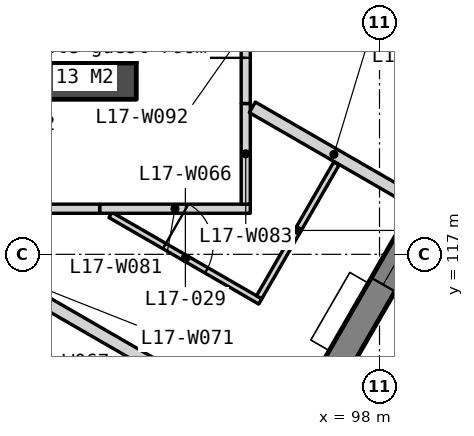
"""IFC4 building model, lengths in metres.
Left out: names, types, materials, properties, quantities, classifications, styles, units other than length and angle.
Written with IfcOpenShell. Run it as: python <this file> out.ifc"""

import sys

from ifc_helpers import new_model, si_unit, direction, frame, frame_2d, origin, place, context, subcontext, project, spatial, polyline, rectangle, outline, extrude, element, fill, save


model = new_model("IFC4")
c1 = context("Model", 3, precision=1e-05, world=origin(), true_north=direction((0.0, 1.0)))
c2 = subcontext(c1, "Body", "Model", "MODEL_VIEW")
j1 = project(units=[si_unit("LENGTHUNIT", "METRE"), si_unit("PLANEANGLEUNIT", "RADIAN")], contexts=[c1])
p1 = place(None, origin())
s1 = spatial("IfcSite", under=j1, at=p1, CompositionType="ELEMENT")
p2 = place(p1, origin())
s2 = spatial("IfcBuilding", under=s1, at=p2, CompositionType="ELEMENT")
p3 = place(p2, frame((0.0, 0.0, 73.5)))
s3 = spatial("IfcBuildingStorey", under=s2, at=p3, CompositionType="ELEMENT", Elevation=73.5)
p4 = place(p3, frame((66.0, 119.85, 0.0), z_axis=(0.0, 0.0, 1.0), x_axis=(1.0, 0.0, 0.0)))
e1 = element("IfcWall", 1, at=p4, inside=s3, PredefinedType="SOLIDWALL", context=c2, shape_type="SweptSolid", body=[
    extrude(rectangle(XDim=28.0, YDim=0.6, at=frame_2d((14.0, 0.0))), origin(), (0.0, 0.0, 1.0), 3.25),
])
p5 = place(p4, frame((6.825, 0.0, 0.0)))
e2 = element("IfcOpeningElement", 2, at=p5, cuts=e1, PredefinedType="OPENING", context=c2, shape_type="SweptSolid", body=[
    extrude(rectangle(XDim=1.8, YDim=2.1, at=frame_2d((0.9, 1.05))), frame((0.0, 0.31, 0.0), z_axis=(0.0, -1.0, 0.0), x_axis=(1.0, 0.0, 0.0)), (0.0, 0.0, 1.0), 0.62),
])
p6 = place(p4, frame((15.85, 0.0, 0.0)))
e3 = element("IfcOpeningElement", 3, at=p6, cuts=e1, PredefinedType="OPENING", context=c2, shape_type="SweptSolid", body=[
    extrude(rectangle(XDim=1.5, YDim=2.1, at=frame_2d((0.75, 1.05))), frame((0.0, 0.31, 0.0), z_axis=(0.0, -1.0, 0.0), x_axis=(1.0, 0.0, 0.0)), (0.0, 0.0, 1.0), 0.62),
])
p7 = place(p4, frame((19.375, 0.0, 0.0)))
e4 = element("IfcOpeningElement", 4, at=p7, cuts=e1, PredefinedType="OPENING", context=c2, shape_type="SweptSolid", body=[
    extrude(rectangle(XDim=1.8, YDim=2.1, at=frame_2d((0.9, 1.05))), frame((0.0, 0.31, 0.0), z_axis=(0.0, -1.0, 0.0), x_axis=(1.0, 0.0, 0.0)), (0.0, 0.0, 1.0), 0.62),
])
p8 = place(p4, frame((4.425, 0.0, 0.0)))
e5 = element("IfcOpeningElement", 5, at=p8, cuts=e1, PredefinedType="OPENING", context=c2, shape_type="SweptSolid", body=[
    extrude(rectangle(XDim=1.0, YDim=2.1, at=frame_2d((0.5, 1.05))), frame((0.0, 0.31, 0.0), z_axis=(0.0, -1.0, 0.0), x_axis=(1.0, 0.0, 0.0)), (0.0, 0.0, 1.0), 0.62),
])
p9 = place(p4, frame((9.783, 0.0, 0.0)))
e6 = element("IfcOpeningElement", 6, at=p9, cuts=e1, PredefinedType="OPENING", context=c2, shape_type="SweptSolid", body=[
    extrude(rectangle(XDim=1.0, YDim=2.1, at=frame_2d((0.5, 1.05))), frame((0.0, 0.31, 0.0), z_axis=(0.0, -1.0, 0.0), x_axis=(1.0, 0.0, 0.0)), (0.0, 0.0, 1.0), 0.62),
])
p10 = place(p4, frame((11.525, 0.0, 0.0)))
e7 = element("IfcOpeningElement", 7, at=p10, cuts=e1, PredefinedType="OPENING", context=c2, shape_type="SweptSolid", body=[
    extrude(rectangle(XDim=1.0, YDim=2.1, at=frame_2d((0.5, 1.05))), frame((0.0, 0.31, 0.0), z_axis=(0.0, -1.0, 0.0), x_axis=(1.0, 0.0, 0.0)), (0.0, 0.0, 1.0), 0.62),
])
p11 = place(p4, frame((13.658, 0.0, 0.0)))
e8 = element("IfcOpeningElement", 8, at=p11, cuts=e1, PredefinedType="OPENING", context=c2, shape_type="SweptSolid", body=[
    extrude(rectangle(XDim=1.0, YDim=2.1, at=frame_2d((0.5, 1.05))), frame((0.0, 0.31, 0.0), z_axis=(0.0, -1.0, 0.0), x_axis=(1.0, 0.0, 0.0)), (0.0, 0.0, 1.0), 0.62),
])
p12 = place(p4, frame((22.575, 0.0, 0.0)))
e9 = element("IfcOpeningElement", 9, at=p12, cuts=e1, PredefinedType="OPENING", context=c2, shape_type="SweptSolid", body=[
    extrude(rectangle(XDim=1.0, YDim=2.1, at=frame_2d((0.5, 1.05))), frame((0.0, 0.31, 0.0), z_axis=(0.0, -1.0, 0.0), x_axis=(1.0, 0.0, 0.0)), (0.0, 0.0, 1.0), 0.62),
])
p13 = place(p3, frame((93.7, 133.95, 0.0), z_axis=(0.0, 0.0, 1.0), x_axis=(0.0, -1.0, 0.0)))
e10 = element("IfcWall", 10, at=p13, inside=s3, PredefinedType="SOLIDWALL", context=c2, shape_type="SweptSolid", body=[
    extrude(rectangle(XDim=13.8, YDim=0.6, at=frame_2d((6.9, 0.0))), origin(), (0.0, 0.0, 1.0), 3.25),
])
p14 = place(p13, frame((0.6, 0.0, 0.0)))
e11 = element("IfcOpeningElement", 11, at=p14, cuts=e10, PredefinedType="OPENING", context=c2, shape_type="SweptSolid", body=[
    extrude(rectangle(XDim=1.1, YDim=2.1, at=frame_2d((0.55, 1.05))), frame((0.0, 0.31, 0.0), z_axis=(0.0, -1.0, 0.0), x_axis=(1.0, 0.0, 0.0)), (0.0, 0.0, 1.0), 0.62),
])
p15 = place(p13, frame((8.35, 0.0, 0.0)))
e12 = element("IfcOpeningElement", 12, at=p15, cuts=e10, PredefinedType="OPENING", context=c2, shape_type="SweptSolid", body=[
    extrude(rectangle(XDim=0.826, YDim=2.1, at=frame_2d((0.413, 1.05))), frame((0.0, 0.31, 0.0), z_axis=(0.0, -1.0, 0.0), x_axis=(1.0, 0.0, 0.0)), (0.0, 0.0, 1.0), 0.62),
])
p16 = place(p13, frame((10.071, 0.0, 0.0)))
e13 = element("IfcOpeningElement", 13, at=p16, cuts=e10, PredefinedType="OPENING", context=c2, shape_type="SweptSolid", body=[
    extrude(rectangle(XDim=1.0, YDim=2.1, at=frame_2d((0.5, 1.05))), frame((0.0, 0.31, 0.0), z_axis=(0.0, -1.0, 0.0), x_axis=(1.0, 0.0, 0.0)), (0.0, 0.0, 1.0), 0.62),
])
p17 = place(p13, frame((12.258, 0.0, 0.0)))
e14 = element("IfcOpeningElement", 14, at=p17, cuts=e10, PredefinedType="OPENING", context=c2, shape_type="SweptSolid", body=[
    extrude(rectangle(XDim=1.0, YDim=2.1, at=frame_2d((0.5, 1.05))), frame((0.0, 0.31, 0.0), z_axis=(0.0, -1.0, 0.0), x_axis=(1.0, 0.0, 0.0)), (0.0, 0.0, 1.0), 0.62),
])
p18 = place(p3, frame((83.105, 90.599, -0.15), z_axis=(0.0, 0.0, 1.0), x_axis=(0.499999201451, 0.866025864826, 0.0)))
e15 = element("IfcWall", 15, at=p18, inside=s3, PredefinedType="SOLIDWALL", context=c2, shape_type="SweptSolid", body=[
    extrude(outline(polyline([(44.8, 0.0), (44.8, 3.4), (0.0, 3.4), (0.0, 0.0), (44.8, 0.0)])), frame((0.0, 0.225, 0.0), z_axis=(0.0, -1.0, 0.0), x_axis=(1.0, 0.0, 0.0)), (0.0, 0.0, 1.0), 0.45),
])
p19 = place(p18, frame((3.03, 0.0, 1.05)))
e16 = element("IfcOpeningElement", 16, at=p19, cuts=e15, PredefinedType="OPENING", context=c2, shape_type="SweptSolid", body=[
    extrude(rectangle(XDim=1.2, YDim=1.5, at=frame_2d((0.6, 0.75))), frame((0.0, 0.235, 0.0), z_axis=(0.0, -1.0, 0.0), x_axis=(1.0, 0.0, 0.0)), (0.0, 0.0, 1.0), 0.47),
])
p20 = place(p18, frame((4.73, 0.0, 1.05)))
e17 = element("IfcOpeningElement", 17, at=p20, cuts=e15, PredefinedType="OPENING", context=c2, shape_type="SweptSolid", body=[
    extrude(rectangle(XDim=1.2, YDim=1.5, at=frame_2d((0.6, 0.75))), frame((0.0, 0.235, 0.0), z_axis=(0.0, -1.0, 0.0), x_axis=(1.0, 0.0, 0.0)), (0.0, 0.0, 1.0), 0.47),
])
p21 = place(p18, frame((11.99, 0.0, 1.05)))
e18 = element("IfcOpeningElement", 18, at=p21, cuts=e15, PredefinedType="OPENING", context=c2, shape_type="SweptSolid", body=[
    extrude(rectangle(XDim=1.2, YDim=1.5, at=frame_2d((0.6, 0.75))), frame((0.0, 0.235, 0.0), z_axis=(0.0, -1.0, 0.0), x_axis=(1.0, 0.0, 0.0)), (0.0, 0.0, 1.0), 0.47),
])
p22 = place(p18, frame((13.69, 0.0, 1.05)))
e19 = element("IfcOpeningElement", 19, at=p22, cuts=e15, PredefinedType="OPENING", context=c2, shape_type="SweptSolid", body=[
    extrude(rectangle(XDim=1.2, YDim=1.5, at=frame_2d((0.6, 0.75))), frame((0.0, 0.235, 0.0), z_axis=(0.0, -1.0, 0.0), x_axis=(1.0, 0.0, 0.0)), (0.0, 0.0, 1.0), 0.47),
])
p23 = place(p18, frame((20.95, 0.0, 1.05)))
e20 = element("IfcOpeningElement", 20, at=p23, cuts=e15, PredefinedType="OPENING", context=c2, shape_type="SweptSolid", body=[
    extrude(rectangle(XDim=1.2, YDim=1.5, at=frame_2d((0.6, 0.75))), frame((0.0, 0.235, 0.0), z_axis=(0.0, -1.0, 0.0), x_axis=(1.0, 0.0, 0.0)), (0.0, 0.0, 1.0), 0.47),
])
p24 = place(p18, frame((22.65, 0.0, 1.05)))
e21 = element("IfcOpeningElement", 21, at=p24, cuts=e15, PredefinedType="OPENING", context=c2, shape_type="SweptSolid", body=[
    extrude(rectangle(XDim=1.2, YDim=1.5, at=frame_2d((0.6, 0.75))), frame((0.0, 0.235, 0.0), z_axis=(0.0, -1.0, 0.0), x_axis=(1.0, 0.0, 0.0)), (0.0, 0.0, 1.0), 0.47),
])
p25 = place(p18, frame((29.91, 0.0, 1.05)))
e22 = element("IfcOpeningElement", 22, at=p25, cuts=e15, PredefinedType="OPENING", context=c2, shape_type="SweptSolid", body=[
    extrude(rectangle(XDim=1.2, YDim=1.5, at=frame_2d((0.6, 0.75))), frame((0.0, 0.235, 0.0), z_axis=(0.0, -1.0, 0.0), x_axis=(1.0, 0.0, 0.0)), (0.0, 0.0, 1.0), 0.47),
])
p26 = place(p18, frame((31.61, 0.0, 1.05)))
e23 = element("IfcOpeningElement", 23, at=p26, cuts=e15, PredefinedType="OPENING", context=c2, shape_type="SweptSolid", body=[
    extrude(rectangle(XDim=1.2, YDim=1.5, at=frame_2d((0.6, 0.75))), frame((0.0, 0.235, 0.0), z_axis=(0.0, -1.0, 0.0), x_axis=(1.0, 0.0, 0.0)), (0.0, 0.0, 1.0), 0.47),
])
p27 = place(p18, frame((38.87, 0.0, 1.05)))
e24 = element("IfcOpeningElement", 24, at=p27, cuts=e15, PredefinedType="OPENING", context=c2, shape_type="SweptSolid", body=[
    extrude(rectangle(XDim=1.2, YDim=1.5, at=frame_2d((0.6, 0.75))), frame((0.0, 0.235, 0.0), z_axis=(0.0, -1.0, 0.0), x_axis=(1.0, 0.0, 0.0)), (0.0, 0.0, 1.0), 0.47),
])
p28 = place(p18, frame((40.57, 0.0, 1.05)))
e25 = element("IfcOpeningElement", 25, at=p28, cuts=e15, PredefinedType="OPENING", context=c2, shape_type="SweptSolid", body=[
    extrude(rectangle(XDim=1.2, YDim=1.5, at=frame_2d((0.6, 0.75))), frame((0.0, 0.235, 0.0), z_axis=(0.0, -1.0, 0.0), x_axis=(1.0, 0.0, 0.0)), (0.0, 0.0, 1.0), 0.47),
])
p29 = place(p3, frame((92.401, 116.27, 0.0), z_axis=(0.0, 0.0, 1.0), x_axis=(0.866030456496, -0.499991248344, 0.0)))
e26 = element("IfcWall", 26, at=p29, inside=s3, PredefinedType="PARTITIONING", context=c2, shape_type="SweptSolid", body=[
    extrude(rectangle(XDim=4.56, YDim=0.2, at=frame_2d((2.28, 0.0))), origin(), (0.0, 0.0, 1.0), 3.25),
])
p30 = place(p3, frame((93.575, 117.647, 0.0), z_axis=(0.0, 0.0, 1.0), x_axis=(0.866048401274, -0.499960165064, 0.0)))
e27 = element("IfcWall", 27, at=p30, inside=s3, PredefinedType="PARTITIONING", context=c2, shape_type="SweptSolid", body=[
    extrude(rectangle(XDim=2.845, YDim=0.1, at=frame_2d((1.422, 0.0))), origin(), (0.0, 0.0, 1.0), 3.25),
])
p31 = place(p30, frame((1.022, 0.0, 0.0)))
e28 = element("IfcOpeningElement", 28, at=p31, cuts=e27, PredefinedType="OPENING", context=c2, shape_type="SweptSolid", body=[
    extrude(rectangle(XDim=0.8, YDim=2.1, at=frame_2d((0.4, 1.05))), frame((0.0, 0.06, 0.0), z_axis=(0.0, -1.0, 0.0), x_axis=(1.0, 0.0, 0.0)), (0.0, 0.0, 1.0), 0.12),
])
p32 = place(p3, frame((93.398, 117.75, 0.0), z_axis=(0.0, 0.0, 1.0), x_axis=(1.0, 0.0, 0.0)))
e29 = element("IfcWall", 29, at=p32, inside=s3, PredefinedType="PARTITIONING", context=c2, shape_type="SweptSolid", body=[
    extrude(rectangle(XDim=2.477, YDim=0.15, at=frame_2d((1.239, 0.0))), origin(), (0.0, 0.0, 1.0), 3.25),
])
p33 = place(p3, frame((90.395, 117.75, 0.0), z_axis=(0.0, 0.0, 1.0), x_axis=(1.0, 0.0, 0.0)))
e30 = element("IfcWall", 30, at=p33, inside=s3, PredefinedType="PARTITIONING", context=c2, shape_type="SweptSolid", body=[
    extrude(rectangle(XDim=3.003, YDim=0.15, at=frame_2d((1.501, 0.0))), origin(), (0.0, 0.0, 1.0), 3.25),
])
p34 = place(p33, frame((1.001, 0.0, 0.0)))
e31 = element("IfcOpeningElement", 31, at=p34, cuts=e30, PredefinedType="OPENING", context=c2, shape_type="SweptSolid", body=[
    extrude(rectangle(XDim=1.0, YDim=2.1, at=frame_2d((0.5, 1.05))), frame((0.0, 0.085, 0.0), z_axis=(0.0, -1.0, 0.0), x_axis=(1.0, 0.0, 0.0)), (0.0, 0.0, 1.0), 0.17),
])
p35 = place(p3, frame((95.8, 117.825, 0.0), z_axis=(0.0, 0.0, 1.0), x_axis=(0.0, 1.0, 0.0)))
e32 = element("IfcWall", 32, at=p35, inside=s3, PredefinedType="PARTITIONING", context=c2, shape_type="SweptSolid", body=[
    extrude(rectangle(XDim=1.656, YDim=0.15, at=frame_2d((0.828, 0.0))), origin(), (0.0, 0.0, 1.0), 3.25),
])
p36 = place(p3, frame((95.908, 119.418, 0.0), z_axis=(0.0, 0.0, 1.0), x_axis=(0.866051688794, -0.499954470265, 0.0)))
e33 = element("IfcWall", 33, at=p36, inside=s3, PredefinedType="PARTITIONING", context=c2, shape_type="SweptSolid", body=[
    extrude(rectangle(XDim=3.097, YDim=0.2, at=frame_2d((1.548, 0.0))), origin(), (0.0, 0.0, 1.0), 3.25),
])
p37 = place(p3, frame((96.021, 116.293, 0.0), z_axis=(0.0, 0.0, 1.0), x_axis=(0.500005339912, 0.866022320763, 0.0)))
e34 = element("IfcWall", 34, at=p37, inside=s3, PredefinedType="PARTITIONING", context=c2, shape_type="SweptSolid", body=[
    extrude(rectangle(XDim=2.54, YDim=0.1, at=frame_2d((1.27, 0.0))), origin(), (0.0, 0.0, 1.0), 3.25),
])
p38 = place(p3, frame((95.8, 119.481, 0.0), z_axis=(0.0, 0.0, 1.0), x_axis=(0.0, 1.0, 0.0)))
e35 = element("IfcWall", 35, at=p38, inside=s3, PredefinedType="PARTITIONING", context=c2, shape_type="SweptSolid", body=[
    extrude(rectangle(XDim=2.402, YDim=0.15, at=frame_2d((1.201, 0.0))), origin(), (0.0, 0.0, 1.0), 3.25),
])
p39 = place(p38, frame((0.751, 0.0, 0.0)))
e36 = element("IfcOpeningElement", 36, at=p39, cuts=e35, PredefinedType="OPENING", context=c2, shape_type="SweptSolid", body=[
    extrude(rectangle(XDim=0.9, YDim=2.1, at=frame_2d((0.45, 1.05))), frame((0.0, 0.085, 0.0), z_axis=(0.0, -1.0, 0.0), x_axis=(1.0, 0.0, 0.0)), (0.0, 0.0, 1.0), 0.17),
])
p40 = place(p25, origin())
e37 = element("IfcWindow", 37, at=p40, inside=s3, PartitioningType="SINGLE_PANEL", PredefinedType="WINDOW", context=c2, shape_type="SweptSolid", body=[
    extrude(rectangle(XDim=1.2, YDim=1.5, at=frame_2d((0.6, 0.75))), frame((0.0, 0.03, 0.0), z_axis=(0.0, -1.0, 0.0), x_axis=(1.0, 0.0, 0.0)), (0.0, 0.0, 1.0), 0.06),
])
fill(e22, e37)
p41 = place(p39, origin())
e38 = element("IfcDoor", 38, at=p41, inside=s3, OperationType="SINGLE_SWING_LEFT", PredefinedType="DOOR", context=c2, shape_type="SweptSolid", body=[
    extrude(rectangle(XDim=0.9, YDim=2.1, at=frame_2d((0.45, 1.05))), frame((0.0, 0.025, 0.0), z_axis=(0.0, -1.0, 0.0), x_axis=(1.0, 0.0, 0.0)), (0.0, 0.0, 1.0), 0.05),
])
fill(e36, e38)
p42 = place(p31, origin())
e39 = element("IfcDoor", 39, at=p42, inside=s3, OperationType="SINGLE_SWING_LEFT", PredefinedType="DOOR", context=c2, shape_type="SweptSolid", body=[
    extrude(rectangle(XDim=0.8, YDim=2.1, at=frame_2d((0.4, 1.05))), frame((0.0, 0.025, 0.0), z_axis=(0.0, -1.0, 0.0), x_axis=(1.0, 0.0, 0.0)), (0.0, 0.0, 1.0), 0.05),
])
fill(e28, e39)
save(model, sys.argv[1])
